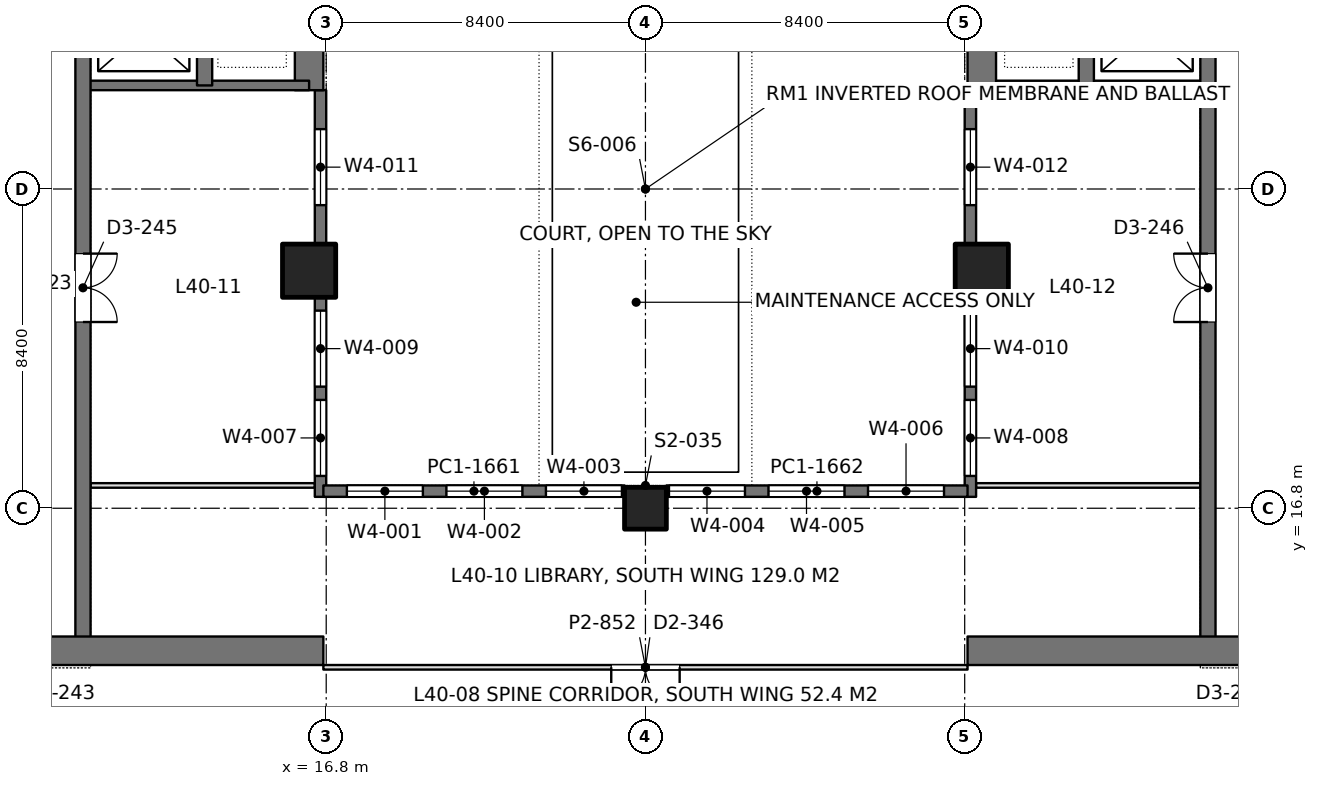
"""IFC4 building model, lengths in metres.
Left out: names, types, materials, properties, quantities, classifications, styles, units other than length and angle.
Written with IfcOpenShell. Run it as: python <this file> out.ifc"""

import sys

from ifc_helpers import new_model, si_unit, direction, frame, frame_2d, origin, origin_2d, place, context, subcontext, project, spatial, rectangle, extrude, element, fill, save


model = new_model("IFC4")
c1 = context("Model", 3, precision=1e-05, world=origin(), true_north=direction((0.0, 1.0)))
c2 = subcontext(c1, "Body", "Model", "MODEL_VIEW")
j1 = project(units=[si_unit("LENGTHUNIT", "METRE"), si_unit("PLANEANGLEUNIT", "RADIAN")], contexts=[c1])
p1 = place(None, origin())
s1 = spatial("IfcSite", under=j1, at=p1, CompositionType="ELEMENT")
p2 = place(p1, origin())
s2 = spatial("IfcBuilding", under=s1, at=p2, CompositionType="ELEMENT")
p3 = place(p2, frame((0.0, 0.0, 177.6)))
s3 = spatial("IfcBuildingStorey", under=s2, at=p3, CompositionType="ELEMENT", Elevation=177.6)
p4 = place(p3, frame((25.2, 16.8, 0.0), z_axis=(0.0, 0.0, 1.0), x_axis=(1.0, 0.0, 0.0)))
e1 = element("IfcColumn", 1, at=p4, inside=s3, PredefinedType="COLUMN", context=c2, shape_type="SweptSolid", body=[
    extrude(rectangle(XDim=1.1, YDim=1.1, at=origin_2d()), origin(), (0.0, 0.0, 1.0), 4.2),
])
for number, where, z_axis, x_axis in (
    (2, (16.35, 23.05, 0.0), (0.0, 0.0, 1.0), (1.0, 0.0, 0.0)),
    (3, (34.05, 23.05, 0.0), (0.0, 0.0, 1.0), (1.0, 0.0, 0.0)),
):
    element("IfcColumn", number, at=place(p3, frame(where, z_axis=z_axis, x_axis=x_axis)), inside=s3, PredefinedType="COLUMN", context=c2, shape_type="SweptSolid", body=[
        extrude(rectangle(XDim=1.4, YDim=1.4, at=origin_2d()), origin(), (0.0, 0.0, 1.0), 4.2),
    ])
p5 = place(p3, frame((-1.125, 13.05, 0.0), z_axis=(0.0, 0.0, 1.0), x_axis=(1.0, 0.0, 0.0)))
e4 = element("IfcWall", 4, at=p5, inside=s3, PredefinedType="SHEAR", context=c2, shape_type="SweptSolid", body=[
    extrude(rectangle(XDim=17.85, YDim=0.75, at=frame_2d((8.925, 0.0))), origin(), (0.0, 0.0, 1.0), 4.2),
])
p6 = place(p5, frame((8.875, 0.0, 0.0)))
e5 = element("IfcOpeningElement", 5, at=p6, cuts=e4, PredefinedType="OPENING", context=c2, shape_type="SweptSolid", body=[
    extrude(rectangle(XDim=1.8, YDim=2.4, at=frame_2d((0.9, 1.2))), frame((0.0, 0.385, 0.0), z_axis=(0.0, -1.0, 0.0), x_axis=(1.0, 0.0, 0.0)), (0.0, 0.0, 1.0), 0.77),
])
p7 = place(p3, frame((16.35, 27.8, 0.0), z_axis=(0.0, 0.0, 1.0), x_axis=(0.0, 1.0, 0.0)))
e6 = element("IfcWall", 6, at=p7, inside=s3, PredefinedType="SHEAR", context=c2, shape_type="SweptSolid", body=[
    extrude(rectangle(XDim=9.55, YDim=0.75, at=frame_2d((4.775, 0.0))), origin(), (0.0, 0.0, 1.0), 4.2),
])
p8 = place(p3, frame((10.4, 13.05, 0.0), z_axis=(0.0, 0.0, 1.0), x_axis=(0.0, 1.0, 0.0)))
e7 = element("IfcWall", 7, at=p8, inside=s3, PredefinedType="SHEAR", context=c2, shape_type="SweptSolid", body=[
    extrude(rectangle(XDim=24.3, YDim=0.4, at=frame_2d((12.15, 0.0))), origin(), (0.0, 0.0, 1.0), 4.2),
])
p9 = place(p8, frame((15.75, 0.0, 0.0)))
e8 = element("IfcOpeningElement", 8, at=p9, cuts=e7, PredefinedType="OPENING", context=c2, shape_type="SweptSolid", body=[
    extrude(rectangle(XDim=1.1, YDim=2.2, at=frame_2d((0.55, 1.1))), frame((0.0, 0.21, 0.0), z_axis=(0.0, -1.0, 0.0), x_axis=(1.0, 0.0, 0.0)), (0.0, 0.0, 1.0), 0.42),
])
p10 = place(p8, frame((18.6, 0.0, 0.0)))
e9 = element("IfcOpeningElement", 9, at=p10, cuts=e7, PredefinedType="OPENING", context=c2, shape_type="SweptSolid", body=[
    extrude(rectangle(XDim=1.1, YDim=2.2, at=frame_2d((0.55, 1.1))), frame((0.0, 0.21, 0.0), z_axis=(0.0, -1.0, 0.0), x_axis=(1.0, 0.0, 0.0)), (0.0, 0.0, 1.0), 0.42),
])
p11 = place(p8, frame((21.45, 0.0, 0.0)))
e10 = element("IfcOpeningElement", 10, at=p11, cuts=e7, PredefinedType="OPENING", context=c2, shape_type="SweptSolid", body=[
    extrude(rectangle(XDim=1.1, YDim=2.2, at=frame_2d((0.55, 1.1))), frame((0.0, 0.21, 0.0), z_axis=(0.0, -1.0, 0.0), x_axis=(1.0, 0.0, 0.0)), (0.0, 0.0, 1.0), 0.42),
])
p12 = place(p8, frame((8.65, 0.0, 0.0)))
e11 = element("IfcOpeningElement", 11, at=p12, cuts=e7, PredefinedType="OPENING", context=c2, shape_type="SweptSolid", body=[
    extrude(rectangle(XDim=1.8, YDim=2.4, at=frame_2d((0.9, 1.2))), frame((0.0, 0.21, 0.0), z_axis=(0.0, -1.0, 0.0), x_axis=(1.0, 0.0, 0.0)), (0.0, 0.0, 1.0), 0.42),
])
p13 = place(p3, frame((13.6, 27.925, 0.0), z_axis=(0.0, 0.0, 1.0), x_axis=(0.0, 1.0, 0.0)))
e12 = element("IfcWall", 12, at=p13, inside=s3, PredefinedType="SHEAR", context=c2, shape_type="SweptSolid", body=[
    extrude(rectangle(XDim=9.425, YDim=0.4, at=frame_2d((4.712, 0.0))), origin(), (0.0, 0.0, 1.0), 4.2),
])
p14 = place(p3, frame((10.4, 27.925, 0.0), z_axis=(0.0, 0.0, 1.0), x_axis=(1.0, 0.0, 0.0)))
e13 = element("IfcWall", 13, at=p14, inside=s3, PredefinedType="SHEAR", context=c2, shape_type="SweptSolid", body=[
    extrude(rectangle(XDim=5.95, YDim=0.25, at=frame_2d((2.975, 0.0))), origin(), (0.0, 0.0, 1.0), 4.2),
])
p15 = place(p3, frame((33.675, 13.05, 0.0), z_axis=(0.0, 0.0, 1.0), x_axis=(1.0, 0.0, 0.0)))
e14 = element("IfcWall", 14, at=p15, inside=s3, PredefinedType="SHEAR", context=c2, shape_type="SweptSolid", body=[
    extrude(rectangle(XDim=17.85, YDim=0.75, at=frame_2d((8.925, 0.0))), origin(), (0.0, 0.0, 1.0), 4.2),
])
p16 = place(p15, frame((7.175, 0.0, 0.0)))
e15 = element("IfcOpeningElement", 15, at=p16, cuts=e14, PredefinedType="OPENING", context=c2, shape_type="SweptSolid", body=[
    extrude(rectangle(XDim=1.8, YDim=2.4, at=frame_2d((0.9, 1.2))), frame((0.0, 0.385, 0.0), z_axis=(0.0, -1.0, 0.0), x_axis=(1.0, 0.0, 0.0)), (0.0, 0.0, 1.0), 0.77),
])
p17 = place(p3, frame((34.05, 27.8, 0.0), z_axis=(0.0, 0.0, 1.0), x_axis=(0.0, 1.0, 0.0)))
e16 = element("IfcWall", 16, at=p17, inside=s3, PredefinedType="SHEAR", context=c2, shape_type="SweptSolid", body=[
    extrude(rectangle(XDim=9.55, YDim=0.75, at=frame_2d((4.775, 0.0))), origin(), (0.0, 0.0, 1.0), 4.2),
])
p18 = place(p3, frame((40.0, 13.05, 0.0), z_axis=(0.0, 0.0, 1.0), x_axis=(0.0, 1.0, 0.0)))
e17 = element("IfcWall", 17, at=p18, inside=s3, PredefinedType="SHEAR", context=c2, shape_type="SweptSolid", body=[
    extrude(rectangle(XDim=24.3, YDim=0.4, at=frame_2d((12.15, 0.0))), origin(), (0.0, 0.0, 1.0), 4.2),
])
p19 = place(p18, frame((15.75, 0.0, 0.0)))
e18 = element("IfcOpeningElement", 18, at=p19, cuts=e17, PredefinedType="OPENING", context=c2, shape_type="SweptSolid", body=[
    extrude(rectangle(XDim=1.1, YDim=2.2, at=frame_2d((0.55, 1.1))), frame((0.0, 0.21, 0.0), z_axis=(0.0, -1.0, 0.0), x_axis=(1.0, 0.0, 0.0)), (0.0, 0.0, 1.0), 0.42),
])
p20 = place(p18, frame((18.6, 0.0, 0.0)))
e19 = element("IfcOpeningElement", 19, at=p20, cuts=e17, PredefinedType="OPENING", context=c2, shape_type="SweptSolid", body=[
    extrude(rectangle(XDim=1.1, YDim=2.2, at=frame_2d((0.55, 1.1))), frame((0.0, 0.21, 0.0), z_axis=(0.0, -1.0, 0.0), x_axis=(1.0, 0.0, 0.0)), (0.0, 0.0, 1.0), 0.42),
])
p21 = place(p18, frame((21.45, 0.0, 0.0)))
e20 = element("IfcOpeningElement", 20, at=p21, cuts=e17, PredefinedType="OPENING", context=c2, shape_type="SweptSolid", body=[
    extrude(rectangle(XDim=1.1, YDim=2.2, at=frame_2d((0.55, 1.1))), frame((0.0, 0.21, 0.0), z_axis=(0.0, -1.0, 0.0), x_axis=(1.0, 0.0, 0.0)), (0.0, 0.0, 1.0), 0.42),
])
p22 = place(p18, frame((8.65, 0.0, 0.0)))
e21 = element("IfcOpeningElement", 21, at=p22, cuts=e17, PredefinedType="OPENING", context=c2, shape_type="SweptSolid", body=[
    extrude(rectangle(XDim=1.8, YDim=2.4, at=frame_2d((0.9, 1.2))), frame((0.0, 0.21, 0.0), z_axis=(0.0, -1.0, 0.0), x_axis=(1.0, 0.0, 0.0)), (0.0, 0.0, 1.0), 0.42),
])
p23 = place(p3, frame((36.8, 27.925, 0.0), z_axis=(0.0, 0.0, 1.0), x_axis=(0.0, 1.0, 0.0)))
e22 = element("IfcWall", 22, at=p23, inside=s3, PredefinedType="SHEAR", context=c2, shape_type="SweptSolid", body=[
    extrude(rectangle(XDim=9.425, YDim=0.4, at=frame_2d((4.712, 0.0))), origin(), (0.0, 0.0, 1.0), 4.2),
])
p24 = place(p3, frame((40.0, 27.925, 0.0), z_axis=(0.0, 0.0, 1.0), x_axis=(-1.0, 0.0, 0.0)))
e23 = element("IfcWall", 23, at=p24, inside=s3, PredefinedType="SHEAR", context=c2, shape_type="SweptSolid", body=[
    extrude(rectangle(XDim=5.95, YDim=0.25, at=frame_2d((2.975, 0.0))), origin(), (0.0, 0.0, 1.0), 4.2),
])
p25 = place(p3, frame((16.65, 17.1, 0.0), z_axis=(0.0, 0.0, 1.0), x_axis=(0.0, 1.0, 0.0)))
e24 = element("IfcWall", 24, at=p25, inside=s3, PredefinedType="SOLIDWALL", context=c2, shape_type="SweptSolid", body=[
    extrude(rectangle(XDim=10.7, YDim=0.3, at=frame_2d((5.35, 0.0))), origin(), (0.0, 0.0, 1.0), 4.05),
])
p26 = place(p25, frame((0.55, 0.0, 0.9)))
e25 = element("IfcOpeningElement", 25, at=p26, cuts=e24, PredefinedType="OPENING", context=c2, shape_type="SweptSolid", body=[
    extrude(rectangle(XDim=2.0, YDim=1.9, at=frame_2d((1.0, 0.95))), frame((0.0, 0.16, 0.0), z_axis=(0.0, -1.0, 0.0), x_axis=(1.0, 0.0, 0.0)), (0.0, 0.0, 1.0), 0.32),
])
p27 = place(p25, frame((2.9, 0.0, 0.9)))
e26 = element("IfcOpeningElement", 26, at=p27, cuts=e24, PredefinedType="OPENING", context=c2, shape_type="SweptSolid", body=[
    extrude(rectangle(XDim=2.0, YDim=1.9, at=frame_2d((1.0, 0.95))), frame((0.0, 0.16, 0.0), z_axis=(0.0, -1.0, 0.0), x_axis=(1.0, 0.0, 0.0)), (0.0, 0.0, 1.0), 0.32),
])
p28 = place(p25, frame((7.675, 0.0, 0.9)))
e27 = element("IfcOpeningElement", 27, at=p28, cuts=e24, PredefinedType="OPENING", context=c2, shape_type="SweptSolid", body=[
    extrude(rectangle(XDim=2.0, YDim=1.9, at=frame_2d((1.0, 0.95))), frame((0.0, 0.16, 0.0), z_axis=(0.0, -1.0, 0.0), x_axis=(1.0, 0.0, 0.0)), (0.0, 0.0, 1.0), 0.32),
])
p29 = place(p3, frame((33.75, 17.1, 0.0), z_axis=(0.0, 0.0, 1.0), x_axis=(0.0, 1.0, 0.0)))
e28 = element("IfcWall", 28, at=p29, inside=s3, PredefinedType="SOLIDWALL", context=c2, shape_type="SweptSolid", body=[
    extrude(rectangle(XDim=10.7, YDim=0.3, at=frame_2d((5.35, 0.0))), origin(), (0.0, 0.0, 1.0), 4.05),
])
p30 = place(p29, frame((0.55, 0.0, 0.9)))
e29 = element("IfcOpeningElement", 29, at=p30, cuts=e28, PredefinedType="OPENING", context=c2, shape_type="SweptSolid", body=[
    extrude(rectangle(XDim=2.0, YDim=1.9, at=frame_2d((1.0, 0.95))), frame((0.0, 0.16, 0.0), z_axis=(0.0, -1.0, 0.0), x_axis=(1.0, 0.0, 0.0)), (0.0, 0.0, 1.0), 0.32),
])
p31 = place(p29, frame((2.9, 0.0, 0.9)))
e30 = element("IfcOpeningElement", 30, at=p31, cuts=e28, PredefinedType="OPENING", context=c2, shape_type="SweptSolid", body=[
    extrude(rectangle(XDim=2.0, YDim=1.9, at=frame_2d((1.0, 0.95))), frame((0.0, 0.16, 0.0), z_axis=(0.0, -1.0, 0.0), x_axis=(1.0, 0.0, 0.0)), (0.0, 0.0, 1.0), 0.32),
])
p32 = place(p29, frame((7.675, 0.0, 0.9)))
e31 = element("IfcOpeningElement", 31, at=p32, cuts=e28, PredefinedType="OPENING", context=c2, shape_type="SweptSolid", body=[
    extrude(rectangle(XDim=2.0, YDim=1.9, at=frame_2d((1.0, 0.95))), frame((0.0, 0.16, 0.0), z_axis=(0.0, -1.0, 0.0), x_axis=(1.0, 0.0, 0.0)), (0.0, 0.0, 1.0), 0.32),
])
p33 = place(p3, frame((16.725, 17.25, 0.0), z_axis=(0.0, 0.0, 1.0), x_axis=(1.0, 0.0, 0.0)))
e32 = element("IfcWall", 32, at=p33, inside=s3, PredefinedType="SOLIDWALL", context=c2, shape_type="SweptSolid", body=[
    extrude(rectangle(XDim=7.925, YDim=0.3, at=frame_2d((3.962, 0.0))), origin(), (0.0, 0.0, 1.0), 4.05),
])
p34 = place(p33, frame((0.619, 0.0, 0.9)))
e33 = element("IfcOpeningElement", 33, at=p34, cuts=e32, PredefinedType="OPENING", context=c2, shape_type="SweptSolid", body=[
    extrude(rectangle(XDim=2.0, YDim=1.9, at=frame_2d((1.0, 0.95))), frame((0.0, 0.16, 0.0), z_axis=(0.0, -1.0, 0.0), x_axis=(1.0, 0.0, 0.0)), (0.0, 0.0, 1.0), 0.32),
])
p35 = place(p33, frame((3.238, 0.0, 0.9)))
e34 = element("IfcOpeningElement", 34, at=p35, cuts=e32, PredefinedType="OPENING", context=c2, shape_type="SweptSolid", body=[
    extrude(rectangle(XDim=2.0, YDim=1.9, at=frame_2d((1.0, 0.95))), frame((0.0, 0.16, 0.0), z_axis=(0.0, -1.0, 0.0), x_axis=(1.0, 0.0, 0.0)), (0.0, 0.0, 1.0), 0.32),
])
p36 = place(p33, frame((5.856, 0.0, 0.9)))
e35 = element("IfcOpeningElement", 35, at=p36, cuts=e32, PredefinedType="OPENING", context=c2, shape_type="SweptSolid", body=[
    extrude(rectangle(XDim=2.0, YDim=1.9, at=frame_2d((1.0, 0.95))), frame((0.0, 0.16, 0.0), z_axis=(0.0, -1.0, 0.0), x_axis=(1.0, 0.0, 0.0)), (0.0, 0.0, 1.0), 0.32),
])
p37 = place(p3, frame((25.75, 17.25, 0.0), z_axis=(0.0, 0.0, 1.0), x_axis=(1.0, 0.0, 0.0)))
e36 = element("IfcWall", 36, at=p37, inside=s3, PredefinedType="SOLIDWALL", context=c2, shape_type="SweptSolid", body=[
    extrude(rectangle(XDim=7.925, YDim=0.3, at=frame_2d((3.962, 0.0))), origin(), (0.0, 0.0, 1.0), 4.05),
])
p38 = place(p37, frame((0.069, 0.0, 0.9)))
e37 = element("IfcOpeningElement", 37, at=p38, cuts=e36, PredefinedType="OPENING", context=c2, shape_type="SweptSolid", body=[
    extrude(rectangle(XDim=2.0, YDim=1.9, at=frame_2d((1.0, 0.95))), frame((0.0, 0.16, 0.0), z_axis=(0.0, -1.0, 0.0), x_axis=(1.0, 0.0, 0.0)), (0.0, 0.0, 1.0), 0.32),
])
p39 = place(p37, frame((2.688, 0.0, 0.9)))
e38 = element("IfcOpeningElement", 38, at=p39, cuts=e36, PredefinedType="OPENING", context=c2, shape_type="SweptSolid", body=[
    extrude(rectangle(XDim=2.0, YDim=1.9, at=frame_2d((1.0, 0.95))), frame((0.0, 0.16, 0.0), z_axis=(0.0, -1.0, 0.0), x_axis=(1.0, 0.0, 0.0)), (0.0, 0.0, 1.0), 0.32),
])
p40 = place(p37, frame((5.306, 0.0, 0.9)))
e39 = element("IfcOpeningElement", 39, at=p40, cuts=e36, PredefinedType="OPENING", context=c2, shape_type="SweptSolid", body=[
    extrude(rectangle(XDim=2.0, YDim=1.9, at=frame_2d((1.0, 0.95))), frame((0.0, 0.16, 0.0), z_axis=(0.0, -1.0, 0.0), x_axis=(1.0, 0.0, 0.0)), (0.0, 0.0, 1.0), 0.32),
])
for number, where, z_axis, x_axis in (
    (40, (10.598, 17.4, 0.0), (0.0, 0.0, 1.0), (1.0, 0.0, 0.0)),
    (41, (33.898, 17.4, 0.0), (0.0, 0.0, 1.0), (1.0, 0.0, 0.0)),
):
    element("IfcWall", number, at=place(p3, frame(where, z_axis=z_axis, x_axis=x_axis)), inside=s3, PredefinedType="PARTITIONING", context=c2, shape_type="SweptSolid", body=[
        extrude(rectangle(XDim=5.904, YDim=0.12, at=frame_2d((2.952, 0.0))), origin(), (0.0, 0.0, 1.0), 3.55),
    ])
p41 = place(p3, frame((16.725, 12.615, 0.0), z_axis=(0.0, 0.0, 1.0), x_axis=(1.0, 0.0, 0.0)))
e42 = element("IfcWall", 42, at=p41, inside=s3, PredefinedType="PARTITIONING", context=c2, shape_type="SweptSolid", body=[
    extrude(rectangle(XDim=16.95, YDim=0.12, at=frame_2d((8.475, 0.0))), origin(), (0.0, 0.0, 1.0), 3.55),
])
p42 = place(p41, frame((7.575, 0.0, 0.0)))
e43 = element("IfcOpeningElement", 43, at=p42, cuts=e42, PredefinedType="OPENING", context=c2, shape_type="SweptSolid", body=[
    extrude(rectangle(XDim=1.8, YDim=2.2, at=frame_2d((0.9, 1.1))), frame((0.0, 0.07, 0.0), z_axis=(0.0, -1.0, 0.0), x_axis=(1.0, 0.0, 0.0)), (0.0, 0.0, 1.0), 0.14),
])
p43 = place(p26, origin())
e44 = element("IfcWindow", 44, at=p43, inside=s3, PartitioningType="SINGLE_PANEL", PredefinedType="WINDOW", context=c2, shape_type="SweptSolid", body=[
    extrude(rectangle(XDim=2.0, YDim=1.9, at=frame_2d((1.0, 0.95))), frame((0.0, 0.03, 0.0), z_axis=(0.0, -1.0, 0.0), x_axis=(1.0, 0.0, 0.0)), (0.0, 0.0, 1.0), 0.06),
])
fill(e25, e44)
p44 = place(p27, origin())
e45 = element("IfcWindow", 45, at=p44, inside=s3, PartitioningType="SINGLE_PANEL", PredefinedType="WINDOW", context=c2, shape_type="SweptSolid", body=[
    extrude(rectangle(XDim=2.0, YDim=1.9, at=frame_2d((1.0, 0.95))), frame((0.0, 0.03, 0.0), z_axis=(0.0, -1.0, 0.0), x_axis=(1.0, 0.0, 0.0)), (0.0, 0.0, 1.0), 0.06),
])
fill(e26, e45)
p45 = place(p28, origin())
e46 = element("IfcWindow", 46, at=p45, inside=s3, PartitioningType="SINGLE_PANEL", PredefinedType="WINDOW", context=c2, shape_type="SweptSolid", body=[
    extrude(rectangle(XDim=2.0, YDim=1.9, at=frame_2d((1.0, 0.95))), frame((0.0, 0.03, 0.0), z_axis=(0.0, -1.0, 0.0), x_axis=(1.0, 0.0, 0.0)), (0.0, 0.0, 1.0), 0.06),
])
fill(e27, e46)
p46 = place(p30, origin())
e47 = element("IfcWindow", 47, at=p46, inside=s3, PartitioningType="SINGLE_PANEL", PredefinedType="WINDOW", context=c2, shape_type="SweptSolid", body=[
    extrude(rectangle(XDim=2.0, YDim=1.9, at=frame_2d((1.0, 0.95))), frame((0.0, 0.03, 0.0), z_axis=(0.0, -1.0, 0.0), x_axis=(1.0, 0.0, 0.0)), (0.0, 0.0, 1.0), 0.06),
])
fill(e29, e47)
p47 = place(p31, origin())
e48 = element("IfcWindow", 48, at=p47, inside=s3, PartitioningType="SINGLE_PANEL", PredefinedType="WINDOW", context=c2, shape_type="SweptSolid", body=[
    extrude(rectangle(XDim=2.0, YDim=1.9, at=frame_2d((1.0, 0.95))), frame((0.0, 0.03, 0.0), z_axis=(0.0, -1.0, 0.0), x_axis=(1.0, 0.0, 0.0)), (0.0, 0.0, 1.0), 0.06),
])
fill(e30, e48)
p48 = place(p32, origin())
e49 = element("IfcWindow", 49, at=p48, inside=s3, PartitioningType="SINGLE_PANEL", PredefinedType="WINDOW", context=c2, shape_type="SweptSolid", body=[
    extrude(rectangle(XDim=2.0, YDim=1.9, at=frame_2d((1.0, 0.95))), frame((0.0, 0.03, 0.0), z_axis=(0.0, -1.0, 0.0), x_axis=(1.0, 0.0, 0.0)), (0.0, 0.0, 1.0), 0.06),
])
fill(e31, e49)
p49 = place(p34, origin())
e50 = element("IfcWindow", 50, at=p49, inside=s3, PartitioningType="SINGLE_PANEL", PredefinedType="WINDOW", context=c2, shape_type="SweptSolid", body=[
    extrude(rectangle(XDim=2.0, YDim=1.9, at=frame_2d((1.0, 0.95))), frame((0.0, 0.03, 0.0), z_axis=(0.0, -1.0, 0.0), x_axis=(1.0, 0.0, 0.0)), (0.0, 0.0, 1.0), 0.06),
])
fill(e33, e50)
p50 = place(p35, origin())
e51 = element("IfcWindow", 51, at=p50, inside=s3, PartitioningType="SINGLE_PANEL", PredefinedType="WINDOW", context=c2, shape_type="SweptSolid", body=[
    extrude(rectangle(XDim=2.0, YDim=1.9, at=frame_2d((1.0, 0.95))), frame((0.0, 0.03, 0.0), z_axis=(0.0, -1.0, 0.0), x_axis=(1.0, 0.0, 0.0)), (0.0, 0.0, 1.0), 0.06),
])
fill(e34, e51)
p51 = place(p36, origin())
e52 = element("IfcWindow", 52, at=p51, inside=s3, PartitioningType="SINGLE_PANEL", PredefinedType="WINDOW", context=c2, shape_type="SweptSolid", body=[
    extrude(rectangle(XDim=2.0, YDim=1.9, at=frame_2d((1.0, 0.95))), frame((0.0, 0.03, 0.0), z_axis=(0.0, -1.0, 0.0), x_axis=(1.0, 0.0, 0.0)), (0.0, 0.0, 1.0), 0.06),
])
fill(e35, e52)
p52 = place(p38, origin())
e53 = element("IfcWindow", 53, at=p52, inside=s3, PartitioningType="SINGLE_PANEL", PredefinedType="WINDOW", context=c2, shape_type="SweptSolid", body=[
    extrude(rectangle(XDim=2.0, YDim=1.9, at=frame_2d((1.0, 0.95))), frame((0.0, 0.03, 0.0), z_axis=(0.0, -1.0, 0.0), x_axis=(1.0, 0.0, 0.0)), (0.0, 0.0, 1.0), 0.06),
])
fill(e37, e53)
p53 = place(p39, origin())
e54 = element("IfcWindow", 54, at=p53, inside=s3, PartitioningType="SINGLE_PANEL", PredefinedType="WINDOW", context=c2, shape_type="SweptSolid", body=[
    extrude(rectangle(XDim=2.0, YDim=1.9, at=frame_2d((1.0, 0.95))), frame((0.0, 0.03, 0.0), z_axis=(0.0, -1.0, 0.0), x_axis=(1.0, 0.0, 0.0)), (0.0, 0.0, 1.0), 0.06),
])
fill(e38, e54)
p54 = place(p40, origin())
e55 = element("IfcWindow", 55, at=p54, inside=s3, PartitioningType="SINGLE_PANEL", PredefinedType="WINDOW", context=c2, shape_type="SweptSolid", body=[
    extrude(rectangle(XDim=2.0, YDim=1.9, at=frame_2d((1.0, 0.95))), frame((0.0, 0.03, 0.0), z_axis=(0.0, -1.0, 0.0), x_axis=(1.0, 0.0, 0.0)), (0.0, 0.0, 1.0), 0.06),
])
fill(e39, e55)
p55 = place(p12, frame((1.8, 0.0, 0.0), z_axis=(0.0, 0.0, 1.0), x_axis=(-1.0, 0.0, 0.0)))
e56 = element("IfcDoor", 56, at=p55, inside=s3, OperationType="DOUBLE_DOOR_SINGLE_SWING", PredefinedType="DOOR", context=c2, shape_type="SweptSolid", body=[
    extrude(rectangle(XDim=1.8, YDim=2.4, at=frame_2d((0.9, 1.2))), frame((0.0, 0.025, 0.0), z_axis=(0.0, -1.0, 0.0), x_axis=(1.0, 0.0, 0.0)), (0.0, 0.0, 1.0), 0.05),
])
fill(e11, e56)
p56 = place(p22, origin())
e57 = element("IfcDoor", 57, at=p56, inside=s3, OperationType="DOUBLE_DOOR_SINGLE_SWING", PredefinedType="DOOR", context=c2, shape_type="SweptSolid", body=[
    extrude(rectangle(XDim=1.8, YDim=2.4, at=frame_2d((0.9, 1.2))), frame((0.0, 0.025, 0.0), z_axis=(0.0, -1.0, 0.0), x_axis=(1.0, 0.0, 0.0)), (0.0, 0.0, 1.0), 0.05),
])
fill(e21, e57)
p57 = place(p42, frame((1.8, 0.0, 0.0), z_axis=(0.0, 0.0, 1.0), x_axis=(-1.0, 0.0, 0.0)))
e58 = element("IfcDoor", 58, at=p57, inside=s3, OperationType="DOUBLE_DOOR_SINGLE_SWING", PredefinedType="DOOR", context=c2, shape_type="SweptSolid", body=[
    extrude(rectangle(XDim=1.8, YDim=2.2, at=frame_2d((0.9, 1.1))), frame((0.0, 0.025, 0.0), z_axis=(0.0, -1.0, 0.0), x_axis=(1.0, 0.0, 0.0)), (0.0, 0.0, 1.0), 0.05),
])
fill(e43, e58)
save(model, sys.argv[1])
